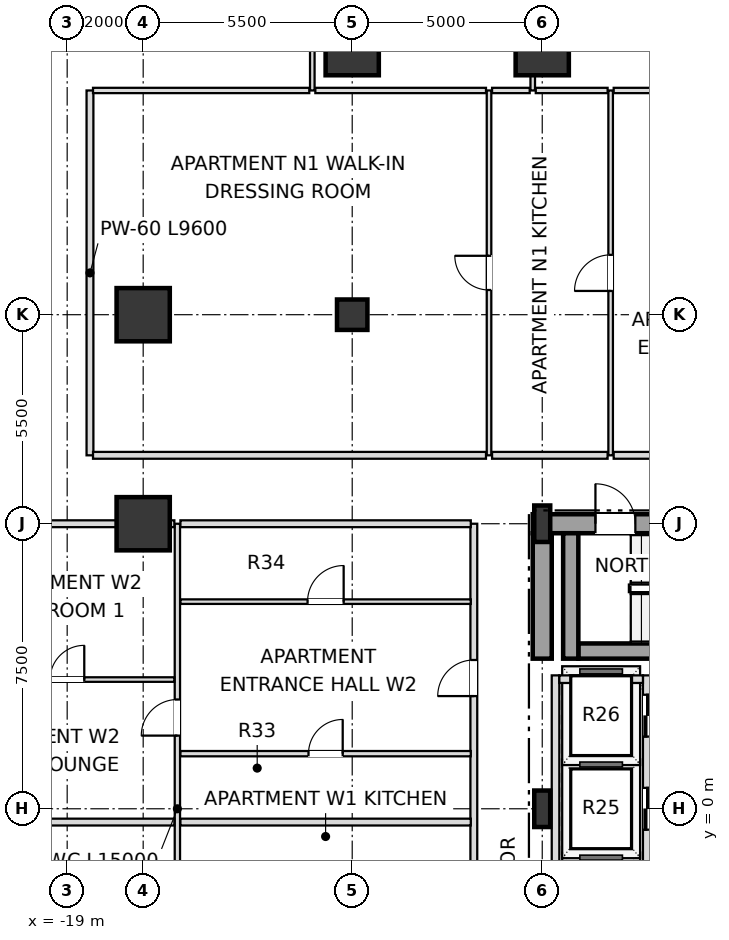
"""IFC4 building model, lengths in metres.
Left out: names, types, materials, properties, quantities, classifications, styles, units other than length and angle.
Written with IfcOpenShell. Run it as: python <this file> out.ifc"""

import sys

from ifc_helpers import new_model, si_unit, direction, frame, frame_2d, origin, origin_2d, place, context, subcontext, project, spatial, rectangle, i_section, extrude, element, fill, save


model = new_model("IFC4")
c1 = context("Model", 3, precision=1e-05, world=origin(), true_north=direction((0.0, 1.0)))
c2 = subcontext(c1, "Body", "Model", "MODEL_VIEW")
j1 = project(units=[si_unit("LENGTHUNIT", "METRE"), si_unit("PLANEANGLEUNIT", "RADIAN")], contexts=[c1])
p1 = place(None, origin())
s1 = spatial("IfcSite", under=j1, at=p1, CompositionType="ELEMENT")
p2 = place(p1, origin())
s2 = spatial("IfcBuilding", under=s1, at=p2, CompositionType="ELEMENT")
p3 = place(p2, frame((0.0, 0.0, 27.6)))
s3 = spatial("IfcBuildingStorey", under=s2, at=p3, CompositionType="ELEMENT", Elevation=27.6)
for number, where, z_axis, x_axis in (
    (1, (-6.5, 0.0, 0.0), (0.0, 0.0, 1.0), (1.0, 0.0, 0.0)),
    (2, (-6.5, 7.5, 0.0), (0.0, 0.0, 1.0), (1.0, 0.0, 0.0)),
):
    element("IfcColumn", number, at=place(p3, frame(where, z_axis=z_axis, x_axis=x_axis)), inside=s3, PredefinedType="COLUMN", context=c2, shape_type="SweptSolid", body=[
        extrude(i_section(OverallWidth=0.42, OverallDepth=0.96, WebThickness=0.022, FlangeThickness=0.034, at=origin_2d()), origin(), (0.0, 0.0, 1.0), 4.8),
    ])
for number, where, z_axis, x_axis in (
    (3, (-6.5, 20.0, 0.0), (0.0, 0.0, 1.0), (1.0, 0.0, 0.0)),
    (4, (-11.5, 20.0, 0.0), (0.0, 0.0, 1.0), (1.0, 0.0, 0.0)),
    (5, (-17.0, 13.0, 0.0), (0.0, 0.0, 1.0), (1.0, 0.0, 0.0)),
    (6, (-17.0, 7.5, 0.0), (0.0, 0.0, 1.0), (1.0, 0.0, 0.0)),
):
    element("IfcColumn", number, at=place(p3, frame(where, z_axis=z_axis, x_axis=x_axis)), inside=s3, PredefinedType="USERDEFINED", context=c2, shape_type="SweptSolid", body=[
        extrude(rectangle(XDim=1.4, YDim=1.4, at=origin_2d()), origin(), (0.0, 0.0, 1.0), 4.8),
    ])
p4 = place(p3, frame((-11.5, 13.0, 0.0), z_axis=(0.0, 0.0, 1.0), x_axis=(1.0, 0.0, 0.0)))
e7 = element("IfcColumn", 7, at=p4, inside=s3, PredefinedType="COLUMN", context=c2, shape_type="SweptSolid", body=[
    extrude(rectangle(XDim=0.8, YDim=0.8, at=origin_2d()), origin(), (0.0, 0.0, 1.0), 4.8),
])
p5 = place(p3, frame((-6.75, 7.5, 0.0), z_axis=(0.0, 0.0, 1.0), x_axis=(1.0, 0.0, 0.0)))
e8 = element("IfcWall", 8, at=p5, inside=s3, PredefinedType="SHEAR", context=c2, shape_type="SweptSolid", body=[
    extrude(rectangle(XDim=6.75, YDim=0.5, at=frame_2d((3.375, 0.0))), origin(), (0.0, 0.0, 1.0), 4.58),
])
p6 = place(p5, frame((1.65, 0.0, 0.0)))
e9 = element("IfcOpeningElement", 9, at=p6, cuts=e8, PredefinedType="OPENING", context=c2, shape_type="SweptSolid", body=[
    extrude(rectangle(XDim=1.05, YDim=2.15, at=frame_2d((0.525, 1.075))), frame((0.0, 0.26, 0.0), z_axis=(0.0, -1.0, 0.0), x_axis=(1.0, 0.0, 0.0)), (0.0, 0.0, 1.0), 0.52),
])
p7 = place(p3, frame((-6.5, 3.95, 0.0), z_axis=(0.0, 0.0, 1.0), x_axis=(0.0, 1.0, 0.0)))
e10 = element("IfcWall", 10, at=p7, inside=s3, PredefinedType="SHEAR", context=c2, shape_type="SweptSolid", body=[
    extrude(rectangle(XDim=3.3, YDim=0.5, at=frame_2d((1.65, 0.0))), origin(), (0.0, 0.0, 1.0), 4.58),
])
p8 = place(p3, frame((-5.55, 4.15, 0.0), z_axis=(0.0, 0.0, 1.0), x_axis=(1.0, 0.0, 0.0)))
e11 = element("IfcWall", 11, at=p8, inside=s3, PredefinedType="SHEAR", context=c2, shape_type="SweptSolid", body=[
    extrude(rectangle(XDim=7.08, YDim=0.4, at=frame_2d((3.54, 0.0))), origin(), (0.0, 0.0, 1.0), 4.58),
])
p9 = place(p3, frame((-5.75, 3.95, 0.0), z_axis=(0.0, 0.0, 1.0), x_axis=(0.0, 1.0, 0.0)))
e12 = element("IfcWall", 12, at=p9, inside=s3, PredefinedType="SHEAR", context=c2, shape_type="SweptSolid", body=[
    extrude(rectangle(XDim=3.3, YDim=0.4, at=frame_2d((1.65, 0.0))), origin(), (0.0, 0.0, 1.0), 4.58),
])
p10 = place(p3, frame((-3.75, -3.51, 0.0), z_axis=(0.0, 0.0, 1.0), x_axis=(0.0, 1.0, 0.0)))
e13 = element("IfcWall", 13, at=p10, inside=s3, PredefinedType="SOLIDWALL", context=c2, shape_type="SweptSolid", body=[
    extrude(rectangle(XDim=7.02, YDim=0.2, at=frame_2d((3.51, 0.0))), origin(), (0.0, 0.0, 1.0), 4.58),
])
p11 = place(p10, frame((0.51, 0.0, 0.0)))
e14 = element("IfcOpeningElement", 14, at=p11, cuts=e13, PredefinedType="OPENING", context=c2, shape_type="SweptSolid", body=[
    extrude(rectangle(XDim=1.1, YDim=2.15, at=frame_2d((0.55, 1.075))), frame((0.0, 0.11, 0.0), z_axis=(0.0, -1.0, 0.0), x_axis=(1.0, 0.0, 0.0)), (0.0, 0.0, 1.0), 0.22),
])
p12 = place(p10, frame((2.96, 0.0, 0.0)))
e15 = element("IfcOpeningElement", 15, at=p12, cuts=e13, PredefinedType="OPENING", context=c2, shape_type="SweptSolid", body=[
    extrude(rectangle(XDim=1.1, YDim=2.15, at=frame_2d((0.55, 1.075))), frame((0.0, 0.11, 0.0), z_axis=(0.0, -1.0, 0.0), x_axis=(1.0, 0.0, 0.0)), (0.0, 0.0, 1.0), 0.22),
])
p13 = place(p10, frame((5.41, 0.0, 0.0)))
e16 = element("IfcOpeningElement", 16, at=p13, cuts=e13, PredefinedType="OPENING", context=c2, shape_type="SweptSolid", body=[
    extrude(rectangle(XDim=1.1, YDim=2.15, at=frame_2d((0.55, 1.075))), frame((0.0, 0.11, 0.0), z_axis=(0.0, -1.0, 0.0), x_axis=(1.0, 0.0, 0.0)), (0.0, 0.0, 1.0), 0.22),
])
p14 = place(p3, frame((-6.15, -3.51, 0.0), z_axis=(0.0, 0.0, 1.0), x_axis=(0.0, 1.0, 0.0)))
e17 = element("IfcWall", 17, at=p14, inside=s3, PredefinedType="SOLIDWALL", context=c2, shape_type="SweptSolid", body=[
    extrude(rectangle(XDim=7.02, YDim=0.2, at=frame_2d((3.51, 0.0))), origin(), (0.0, 0.0, 1.0), 4.58),
])
p15 = place(p3, frame((-6.05, 3.41, 0.0), z_axis=(0.0, 0.0, 1.0), x_axis=(1.0, 0.0, 0.0)))
e18 = element("IfcWall", 18, at=p15, inside=s3, PredefinedType="SOLIDWALL", context=c2, shape_type="SweptSolid", body=[
    extrude(rectangle(XDim=2.2, YDim=0.2, at=frame_2d((1.1, 0.0))), origin(), (0.0, 0.0, 1.0), 4.58),
])
p16 = place(p3, frame((-18.4, 9.3, 0.0), z_axis=(0.0, 0.0, 1.0), x_axis=(0.0, 1.0, 0.0)))
e19 = element("IfcWall", 19, at=p16, inside=s3, PredefinedType="PARTITIONING", context=c2, shape_type="SweptSolid", body=[
    extrude(rectangle(XDim=9.6, YDim=0.18, at=frame_2d((4.8, 0.0))), origin(), (0.0, 0.0, 1.0), 3.936),
])
p17 = place(p3, frame((-16.1, -7.5, 0.0), z_axis=(0.0, 0.0, 1.0), x_axis=(0.0, 1.0, 0.0)))
e20 = element("IfcWall", 20, at=p17, inside=s3, PredefinedType="PARTITIONING", context=c2, shape_type="SweptSolid", body=[
    extrude(rectangle(XDim=15.0, YDim=0.14, at=frame_2d((7.5, 0.0))), origin(), (0.0, 0.0, 1.0), 4.58),
])
p18 = place(p17, frame((2.305, 0.0, 0.0)))
e21 = element("IfcOpeningElement", 21, at=p18, cuts=e20, PredefinedType="OPENING", context=c2, shape_type="SweptSolid", body=[
    extrude(rectangle(XDim=0.95, YDim=2.1, at=frame_2d((0.475, 1.05))), frame((0.0, 0.08, 0.0), z_axis=(0.0, -1.0, 0.0), x_axis=(1.0, 0.0, 0.0)), (0.0, 0.0, 1.0), 0.16),
])
p19 = place(p17, frame((9.425, 0.0, 0.0)))
e22 = element("IfcOpeningElement", 22, at=p19, cuts=e20, PredefinedType="OPENING", context=c2, shape_type="SweptSolid", body=[
    extrude(rectangle(XDim=0.95, YDim=2.1, at=frame_2d((0.475, 1.05))), frame((0.0, 0.08, 0.0), z_axis=(0.0, -1.0, 0.0), x_axis=(1.0, 0.0, 0.0)), (0.0, 0.0, 1.0), 0.16),
])
p20 = place(p3, frame((-12.55, 18.9, 0.0), z_axis=(0.0, 0.0, 1.0), x_axis=(0.0, 1.0, 0.0)))
e23 = element("IfcWall", 23, at=p20, inside=s3, PredefinedType="PARTITIONING", context=c2, shape_type="SweptSolid", body=[
    extrude(rectangle(XDim=6.0, YDim=0.12, at=frame_2d((3.0, 0.0))), origin(), (0.0, 0.0, 1.0), 3.936),
])
p21 = place(p20, frame((2.55, 0.0, 0.0)))
e24 = element("IfcOpeningElement", 24, at=p21, cuts=e23, PredefinedType="OPENING", context=c2, shape_type="SweptSolid", body=[
    extrude(rectangle(XDim=0.9, YDim=2.1, at=frame_2d((0.45, 1.05))), frame((0.0, 0.07, 0.0), z_axis=(0.0, -1.0, 0.0), x_axis=(1.0, 0.0, 0.0)), (0.0, 0.0, 1.0), 0.14),
])
p22 = place(p3, frame((-8.3, -7.5, 0.0), z_axis=(0.0, 0.0, 1.0), x_axis=(0.0, 1.0, 0.0)))
e25 = element("IfcWall", 25, at=p22, inside=s3, PredefinedType="PARTITIONING", context=c2, shape_type="SweptSolid", body=[
    extrude(rectangle(XDim=15.0, YDim=0.18, at=frame_2d((7.5, 0.0))), origin(), (0.0, 0.0, 1.0), 4.58),
])
p23 = place(p22, frame((2.965, 0.0, 0.0)))
e26 = element("IfcOpeningElement", 26, at=p23, cuts=e25, PredefinedType="OPENING", context=c2, shape_type="SweptSolid", body=[
    extrude(rectangle(XDim=0.95, YDim=2.15, at=frame_2d((0.475, 1.075))), frame((0.0, 0.1, 0.0), z_axis=(0.0, -1.0, 0.0), x_axis=(1.0, 0.0, 0.0)), (0.0, 0.0, 1.0), 0.2),
])
p24 = place(p22, frame((10.465, 0.0, 0.0)))
e27 = element("IfcOpeningElement", 27, at=p24, cuts=e25, PredefinedType="OPENING", context=c2, shape_type="SweptSolid", body=[
    extrude(rectangle(XDim=0.95, YDim=2.15, at=frame_2d((0.475, 1.075))), frame((0.0, 0.1, 0.0), z_axis=(0.0, -1.0, 0.0), x_axis=(1.0, 0.0, 0.0)), (0.0, 0.0, 1.0), 0.2),
])
p25 = place(p3, frame((-7.9, 9.3, 0.0), z_axis=(0.0, 0.0, 1.0), x_axis=(0.0, 1.0, 0.0)))
e28 = element("IfcWall", 28, at=p25, inside=s3, PredefinedType="PARTITIONING", context=c2, shape_type="SweptSolid", body=[
    extrude(rectangle(XDim=9.6, YDim=0.12, at=frame_2d((4.8, 0.0))), origin(), (0.0, 0.0, 1.0), 4.016),
])
p26 = place(p25, frame((4.35, 0.0, 0.0)))
e29 = element("IfcOpeningElement", 29, at=p26, cuts=e28, PredefinedType="OPENING", context=c2, shape_type="SweptSolid", body=[
    extrude(rectangle(XDim=0.9, YDim=2.1, at=frame_2d((0.45, 1.05))), frame((0.0, 0.07, 0.0), z_axis=(0.0, -1.0, 0.0), x_axis=(1.0, 0.0, 0.0)), (0.0, 0.0, 1.0), 0.14),
])
p27 = place(p3, frame((-6.75, 18.9, 0.0), z_axis=(0.0, 0.0, 1.0), x_axis=(0.0, 1.0, 0.0)))
e30 = element("IfcWall", 30, at=p27, inside=s3, PredefinedType="PARTITIONING", context=c2, shape_type="SweptSolid", body=[
    extrude(rectangle(XDim=6.0, YDim=0.12, at=frame_2d((3.0, 0.0))), origin(), (0.0, 0.0, 1.0), 4.016),
])
p28 = place(p27, frame((2.55, 0.0, 0.0)))
e31 = element("IfcOpeningElement", 31, at=p28, cuts=e30, PredefinedType="OPENING", context=c2, shape_type="SweptSolid", body=[
    extrude(rectangle(XDim=0.9, YDim=2.1, at=frame_2d((0.45, 1.05))), frame((0.0, 0.07, 0.0), z_axis=(0.0, -1.0, 0.0), x_axis=(1.0, 0.0, 0.0)), (0.0, 0.0, 1.0), 0.14),
])
p29 = place(p3, frame((-4.7, 9.3, 0.0), z_axis=(0.0, 0.0, 1.0), x_axis=(0.0, 1.0, 0.0)))
e32 = element("IfcWall", 32, at=p29, inside=s3, PredefinedType="PARTITIONING", context=c2, shape_type="SweptSolid", body=[
    extrude(rectangle(XDim=9.6, YDim=0.12, at=frame_2d((4.8, 0.0))), origin(), (0.0, 0.0, 1.0), 4.148),
])
p30 = place(p29, frame((4.325, 0.0, 0.0)))
e33 = element("IfcOpeningElement", 33, at=p30, cuts=e32, PredefinedType="OPENING", context=c2, shape_type="SweptSolid", body=[
    extrude(rectangle(XDim=0.95, YDim=2.1, at=frame_2d((0.475, 1.05))), frame((0.0, 0.07, 0.0), z_axis=(0.0, -1.0, 0.0), x_axis=(1.0, 0.0, 0.0)), (0.0, 0.0, 1.0), 0.14),
])
p31 = place(p3, frame((-21.82, -0.35, 0.0), z_axis=(0.0, 0.0, 1.0), x_axis=(1.0, 0.0, 0.0)))
e34 = element("IfcWall", 34, at=p31, inside=s3, PredefinedType="PARTITIONING", context=c2, shape_type="SweptSolid", body=[
    extrude(rectangle(XDim=5.64, YDim=0.18, at=frame_2d((2.82, 0.0))), origin(), (0.0, 0.0, 1.0), 4.016),
])
p32 = place(p3, frame((-16.02, -0.35, 0.0), z_axis=(0.0, 0.0, 1.0), x_axis=(1.0, 0.0, 0.0)))
e35 = element("IfcWall", 35, at=p32, inside=s3, PredefinedType="PARTITIONING", context=c2, shape_type="SweptSolid", body=[
    extrude(rectangle(XDim=7.64, YDim=0.18, at=frame_2d((3.82, 0.0))), origin(), (0.0, 0.0, 1.0), 4.148),
])
p33 = place(p3, frame((-16.02, 1.45, 0.0), z_axis=(0.0, 0.0, 1.0), x_axis=(1.0, 0.0, 0.0)))
e36 = element("IfcWall", 36, at=p33, inside=s3, PredefinedType="PARTITIONING", context=c2, shape_type="SweptSolid", body=[
    extrude(rectangle(XDim=7.64, YDim=0.14, at=frame_2d((3.82, 0.0))), origin(), (0.0, 0.0, 1.0), 4.148),
])
p34 = place(p33, frame((3.37, 0.0, 0.0)))
e37 = element("IfcOpeningElement", 37, at=p34, cuts=e36, PredefinedType="OPENING", context=c2, shape_type="SweptSolid", body=[
    extrude(rectangle(XDim=0.9, YDim=2.1, at=frame_2d((0.45, 1.05))), frame((0.0, 0.08, 0.0), z_axis=(0.0, -1.0, 0.0), x_axis=(1.0, 0.0, 0.0)), (0.0, 0.0, 1.0), 0.16),
])
p35 = place(p3, frame((-21.82, 3.4, 0.0), z_axis=(0.0, 0.0, 1.0), x_axis=(1.0, 0.0, 0.0)))
e38 = element("IfcWall", 38, at=p35, inside=s3, PredefinedType="PARTITIONING", context=c2, shape_type="SweptSolid", body=[
    extrude(rectangle(XDim=5.64, YDim=0.12, at=frame_2d((2.82, 0.0))), origin(), (0.0, 0.0, 1.0), 4.016),
])
p36 = place(p35, frame((2.37, 0.0, 0.0)))
e39 = element("IfcOpeningElement", 39, at=p36, cuts=e38, PredefinedType="OPENING", context=c2, shape_type="SweptSolid", body=[
    extrude(rectangle(XDim=0.9, YDim=2.1, at=frame_2d((0.45, 1.05))), frame((0.0, 0.07, 0.0), z_axis=(0.0, -1.0, 0.0), x_axis=(1.0, 0.0, 0.0)), (0.0, 0.0, 1.0), 0.14),
])
p37 = place(p3, frame((-16.02, 5.45, 0.0), z_axis=(0.0, 0.0, 1.0), x_axis=(1.0, 0.0, 0.0)))
e40 = element("IfcWall", 40, at=p37, inside=s3, PredefinedType="PARTITIONING", context=c2, shape_type="SweptSolid", body=[
    extrude(rectangle(XDim=7.64, YDim=0.12, at=frame_2d((3.82, 0.0))), origin(), (0.0, 0.0, 1.0), 4.148),
])
p38 = place(p37, frame((3.345, 0.0, 0.0)))
e41 = element("IfcOpeningElement", 41, at=p38, cuts=e40, PredefinedType="OPENING", context=c2, shape_type="SweptSolid", body=[
    extrude(rectangle(XDim=0.95, YDim=2.1, at=frame_2d((0.475, 1.05))), frame((0.0, 0.07, 0.0), z_axis=(0.0, -1.0, 0.0), x_axis=(1.0, 0.0, 0.0)), (0.0, 0.0, 1.0), 0.14),
])
p39 = place(p3, frame((-21.9, 7.5, 0.0), z_axis=(0.0, 0.0, 1.0), x_axis=(1.0, 0.0, 0.0)))
e42 = element("IfcWall", 42, at=p39, inside=s3, PredefinedType="PARTITIONING", context=c2, shape_type="SweptSolid", body=[
    extrude(rectangle(XDim=5.72, YDim=0.18, at=frame_2d((2.86, 0.0))), origin(), (0.0, 0.0, 1.0), 4.016),
])
p40 = place(p3, frame((-16.02, 7.5, 0.0), z_axis=(0.0, 0.0, 1.0), x_axis=(1.0, 0.0, 0.0)))
e43 = element("IfcWall", 43, at=p40, inside=s3, PredefinedType="PARTITIONING", context=c2, shape_type="SweptSolid", body=[
    extrude(rectangle(XDim=7.64, YDim=0.18, at=frame_2d((3.82, 0.0))), origin(), (0.0, 0.0, 1.0), 4.016),
])
p41 = place(p3, frame((-18.32, 9.3, 0.0), z_axis=(0.0, 0.0, 1.0), x_axis=(1.0, 0.0, 0.0)))
e44 = element("IfcWall", 44, at=p41, inside=s3, PredefinedType="PARTITIONING", context=c2, shape_type="SweptSolid", body=[
    extrude(rectangle(XDim=10.34, YDim=0.18, at=frame_2d((5.17, 0.0))), origin(), (0.0, 0.0, 1.0), 4.016),
])
p42 = place(p3, frame((-7.82, 9.3, 0.0), z_axis=(0.0, 0.0, 1.0), x_axis=(1.0, 0.0, 0.0)))
e45 = element("IfcWall", 45, at=p42, inside=s3, PredefinedType="PARTITIONING", context=c2, shape_type="SweptSolid", body=[
    extrude(rectangle(XDim=3.04, YDim=0.18, at=frame_2d((1.52, 0.0))), origin(), (0.0, 0.0, 1.0), 4.016),
])
p43 = place(p3, frame((-4.62, 9.3, 0.0), z_axis=(0.0, 0.0, 1.0), x_axis=(1.0, 0.0, 0.0)))
e46 = element("IfcWall", 46, at=p43, inside=s3, PredefinedType="PARTITIONING", context=c2, shape_type="SweptSolid", body=[
    extrude(rectangle(XDim=4.04, YDim=0.18, at=frame_2d((2.02, 0.0))), origin(), (0.0, 0.0, 1.0), 4.58),
])
p44 = place(p43, frame((1.565, 0.0, 0.0)))
e47 = element("IfcOpeningElement", 47, at=p44, cuts=e46, PredefinedType="OPENING", context=c2, shape_type="SweptSolid", body=[
    extrude(rectangle(XDim=0.95, YDim=2.15, at=frame_2d((0.475, 1.075))), frame((0.0, 0.1, 0.0), z_axis=(0.0, -1.0, 0.0), x_axis=(1.0, 0.0, 0.0)), (0.0, 0.0, 1.0), 0.2),
])
p45 = place(p3, frame((-18.32, 18.9, 0.0), z_axis=(0.0, 0.0, 1.0), x_axis=(1.0, 0.0, 0.0)))
e48 = element("IfcWall", 48, at=p45, inside=s3, PredefinedType="PARTITIONING", context=c2, shape_type="SweptSolid", body=[
    extrude(rectangle(XDim=5.69, YDim=0.14, at=frame_2d((2.845, 0.0))), origin(), (0.0, 0.0, 1.0), 3.936),
])
p46 = place(p3, frame((-12.47, 18.9, 0.0), z_axis=(0.0, 0.0, 1.0), x_axis=(1.0, 0.0, 0.0)))
e49 = element("IfcWall", 49, at=p46, inside=s3, PredefinedType="PARTITIONING", context=c2, shape_type="SweptSolid", body=[
    extrude(rectangle(XDim=4.49, YDim=0.14, at=frame_2d((2.245, 0.0))), origin(), (0.0, 0.0, 1.0), 3.936),
])
p47 = place(p3, frame((-7.82, 18.9, 0.0), z_axis=(0.0, 0.0, 1.0), x_axis=(1.0, 0.0, 0.0)))
e50 = element("IfcWall", 50, at=p47, inside=s3, PredefinedType="PARTITIONING", context=c2, shape_type="SweptSolid", body=[
    extrude(rectangle(XDim=0.99, YDim=0.14, at=frame_2d((0.495, 0.0))), origin(), (0.0, 0.0, 1.0), 4.58),
])
p48 = place(p3, frame((-6.67, 18.9, 0.0), z_axis=(0.0, 0.0, 1.0), x_axis=(1.0, 0.0, 0.0)))
e51 = element("IfcWall", 51, at=p48, inside=s3, PredefinedType="PARTITIONING", context=c2, shape_type="SweptSolid", body=[
    extrude(rectangle(XDim=1.89, YDim=0.14, at=frame_2d((0.945, 0.0))), origin(), (0.0, 0.0, 1.0), 4.016),
])
p49 = place(p3, frame((-4.62, 18.9, 0.0), z_axis=(0.0, 0.0, 1.0), x_axis=(1.0, 0.0, 0.0)))
e52 = element("IfcWall", 52, at=p49, inside=s3, PredefinedType="PARTITIONING", context=c2, shape_type="SweptSolid", body=[
    extrude(rectangle(XDim=4.04, YDim=0.14, at=frame_2d((2.02, 0.0))), origin(), (0.0, 0.0, 1.0), 4.58),
])
p50 = place(p49, frame((1.565, 0.0, 0.0)))
e53 = element("IfcOpeningElement", 53, at=p50, cuts=e52, PredefinedType="OPENING", context=c2, shape_type="SweptSolid", body=[
    extrude(rectangle(XDim=0.95, YDim=2.1, at=frame_2d((0.475, 1.05))), frame((0.0, 0.08, 0.0), z_axis=(0.0, -1.0, 0.0), x_axis=(1.0, 0.0, 0.0)), (0.0, 0.0, 1.0), 0.16),
])
p51 = place(p6, origin())
e54 = element("IfcDoor", 54, at=p51, inside=s3, OperationType="SINGLE_SWING_LEFT", PredefinedType="DOOR", context=c2, shape_type="SweptSolid", body=[
    extrude(rectangle(XDim=1.05, YDim=2.15, at=frame_2d((0.525, 1.075))), frame((0.0, 0.025, 0.0), z_axis=(0.0, -1.0, 0.0), x_axis=(1.0, 0.0, 0.0)), (0.0, 0.0, 1.0), 0.05),
])
fill(e9, e54)
p52 = place(p12, origin())
e55 = element("IfcDoor", 55, at=p52, inside=s3, OperationType="DOUBLE_DOOR_SLIDING", PredefinedType="DOOR", context=c2, shape_type="SweptSolid", body=[
    extrude(rectangle(XDim=1.1, YDim=2.15, at=frame_2d((0.55, 1.075))), frame((0.0, 0.025, 0.0), z_axis=(0.0, -1.0, 0.0), x_axis=(1.0, 0.0, 0.0)), (0.0, 0.0, 1.0), 0.05),
])
fill(e15, e55)
p53 = place(p13, origin())
e56 = element("IfcDoor", 56, at=p53, inside=s3, OperationType="DOUBLE_DOOR_SLIDING", PredefinedType="DOOR", context=c2, shape_type="SweptSolid", body=[
    extrude(rectangle(XDim=1.1, YDim=2.15, at=frame_2d((0.55, 1.075))), frame((0.0, 0.025, 0.0), z_axis=(0.0, -1.0, 0.0), x_axis=(1.0, 0.0, 0.0)), (0.0, 0.0, 1.0), 0.05),
])
fill(e16, e56)
p54 = place(p30, origin())
e57 = element("IfcDoor", 57, at=p54, inside=s3, OperationType="SINGLE_SWING_LEFT", PredefinedType="DOOR", context=c2, shape_type="SweptSolid", body=[
    extrude(rectangle(XDim=0.95, YDim=2.1, at=frame_2d((0.475, 1.05))), frame((0.0, 0.025, 0.0), z_axis=(0.0, -1.0, 0.0), x_axis=(1.0, 0.0, 0.0)), (0.0, 0.0, 1.0), 0.05),
])
fill(e33, e57)
p55 = place(p26, origin())
e58 = element("IfcDoor", 58, at=p55, inside=s3, OperationType="SINGLE_SWING_RIGHT", PredefinedType="DOOR", context=c2, shape_type="SweptSolid", body=[
    extrude(rectangle(XDim=0.9, YDim=2.1, at=frame_2d((0.45, 1.05))), frame((0.0, 0.025, 0.0), z_axis=(0.0, -1.0, 0.0), x_axis=(1.0, 0.0, 0.0)), (0.0, 0.0, 1.0), 0.05),
])
fill(e29, e58)
p56 = place(p34, origin())
e59 = element("IfcDoor", 59, at=p56, inside=s3, OperationType="SINGLE_SWING_RIGHT", PredefinedType="DOOR", context=c2, shape_type="SweptSolid", body=[
    extrude(rectangle(XDim=0.9, YDim=2.1, at=frame_2d((0.45, 1.05))), frame((0.0, 0.025, 0.0), z_axis=(0.0, -1.0, 0.0), x_axis=(1.0, 0.0, 0.0)), (0.0, 0.0, 1.0), 0.05),
])
fill(e37, e59)
p57 = place(p24, origin())
e60 = element("IfcDoor", 60, at=p57, inside=s3, OperationType="SINGLE_SWING_LEFT", PredefinedType="DOOR", context=c2, shape_type="SweptSolid", body=[
    extrude(rectangle(XDim=0.95, YDim=2.15, at=frame_2d((0.475, 1.075))), frame((0.0, 0.025, 0.0), z_axis=(0.0, -1.0, 0.0), x_axis=(1.0, 0.0, 0.0)), (0.0, 0.0, 1.0), 0.05),
])
fill(e27, e60)
p58 = place(p38, origin())
e61 = element("IfcDoor", 61, at=p58, inside=s3, OperationType="SINGLE_SWING_RIGHT", PredefinedType="DOOR", context=c2, shape_type="SweptSolid", body=[
    extrude(rectangle(XDim=0.95, YDim=2.1, at=frame_2d((0.475, 1.05))), frame((0.0, 0.025, 0.0), z_axis=(0.0, -1.0, 0.0), x_axis=(1.0, 0.0, 0.0)), (0.0, 0.0, 1.0), 0.05),
])
fill(e41, e61)
p59 = place(p19, origin())
e62 = element("IfcDoor", 62, at=p59, inside=s3, OperationType="SINGLE_SWING_LEFT", PredefinedType="DOOR", context=c2, shape_type="SweptSolid", body=[
    extrude(rectangle(XDim=0.95, YDim=2.1, at=frame_2d((0.475, 1.05))), frame((0.0, 0.025, 0.0), z_axis=(0.0, -1.0, 0.0), x_axis=(1.0, 0.0, 0.0)), (0.0, 0.0, 1.0), 0.05),
])
fill(e22, e62)
p60 = place(p36, origin())
e63 = element("IfcDoor", 63, at=p60, inside=s3, OperationType="SINGLE_SWING_RIGHT", PredefinedType="DOOR", context=c2, shape_type="SweptSolid", body=[
    extrude(rectangle(XDim=0.9, YDim=2.1, at=frame_2d((0.45, 1.05))), frame((0.0, 0.025, 0.0), z_axis=(0.0, -1.0, 0.0), x_axis=(1.0, 0.0, 0.0)), (0.0, 0.0, 1.0), 0.05),
])
fill(e39, e63)
save(model, sys.argv[1])
